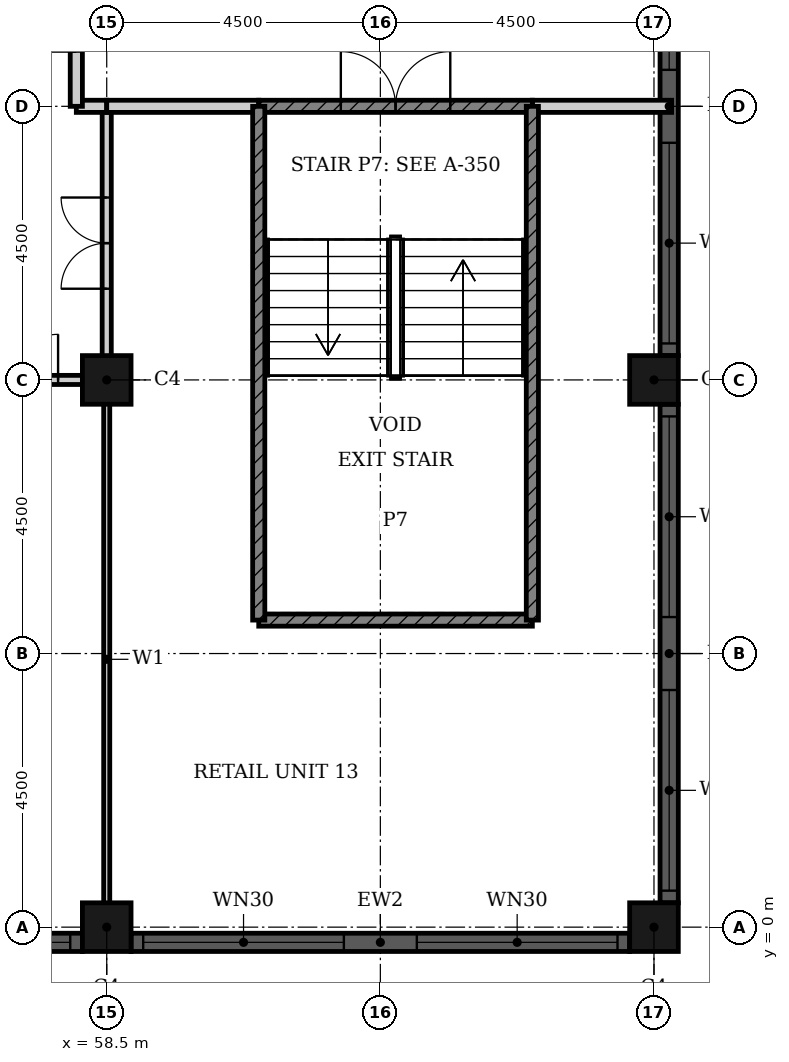
"""IFC4 building model, lengths in metres.
Left out: names, types, materials, properties, quantities, classifications, styles, units other than length and angle.
Written with IfcOpenShell. Run it as: python <this file> out.ifc"""

import sys

from ifc_helpers import new_model, si_unit, direction, frame, frame_2d, origin, origin_2d, place, context, subcontext, project, spatial, rectangle, hollow_rectangle, extrude, element, fill, save


model = new_model("IFC4")
c1 = context("Model", 3, precision=1e-05, world=origin(), true_north=direction((0.0, 1.0)))
c2 = subcontext(c1, "Body", "Model", "MODEL_VIEW")
j1 = project(units=[si_unit("LENGTHUNIT", "METRE"), si_unit("PLANEANGLEUNIT", "RADIAN")], contexts=[c1])
p1 = place(None, origin())
s1 = spatial("IfcSite", under=j1, at=p1, CompositionType="ELEMENT")
p2 = place(p1, origin())
s2 = spatial("IfcBuilding", under=s1, at=p2, CompositionType="ELEMENT")
p3 = place(p2, frame((0.0, 0.0, 6.6)))
s3 = spatial("IfcBuildingStorey", under=s2, at=p3, CompositionType="ELEMENT", Elevation=6.6)
for number, where, z_axis, x_axis in (
    (1, (58.5, 0.0, 0.0), (0.0, 0.0, 1.0), (1.0, 0.0, 0.0)),
    (2, (67.5, 0.0, 0.0), (0.0, 0.0, 1.0), (1.0, 0.0, 0.0)),
    (3, (67.5, 9.0, 0.0), (0.0, 0.0, 1.0), (1.0, 0.0, 0.0)),
    (4, (58.5, 9.0, 0.0), (0.0, 0.0, 1.0), (1.0, 0.0, 0.0)),
):
    element("IfcColumn", number, at=place(p3, frame(where, z_axis=z_axis, x_axis=x_axis)), inside=s3, PredefinedType="COLUMN", context=c2, shape_type="SweptSolid", body=[
        extrude(hollow_rectangle(XDim=0.8, YDim=0.8, WallThickness=0.025, at=origin_2d()), origin(), (0.0, 0.0, 1.0), 5.4),
    ])
p4 = place(p3, frame((67.75, 0.4, 0.0), z_axis=(0.0, 0.0, 1.0), x_axis=(0.0, 1.0, 0.0)))
e5 = element("IfcWall", 5, at=p4, inside=s3, PredefinedType="SOLIDWALL", context=c2, shape_type="SweptSolid", body=[
    extrude(rectangle(XDim=8.2, YDim=0.3, at=frame_2d((4.1, 0.0))), origin(), (0.0, 0.0, 1.0), 5.4),
])
p5 = place(p4, frame((0.2, 0.0, 0.9)))
e6 = element("IfcOpeningElement", 6, at=p5, cuts=e5, PredefinedType="OPENING", context=c2, shape_type="SweptSolid", body=[
    extrude(rectangle(XDim=3.3, YDim=3.5, at=frame_2d((1.65, 1.75))), frame((0.0, 0.16, 0.0), z_axis=(0.0, -1.0, 0.0), x_axis=(1.0, 0.0, 0.0)), (0.0, 0.0, 1.0), 0.32),
])
p6 = place(p4, frame((4.7, 0.0, 0.9)))
e7 = element("IfcOpeningElement", 7, at=p6, cuts=e5, PredefinedType="OPENING", context=c2, shape_type="SweptSolid", body=[
    extrude(rectangle(XDim=3.3, YDim=3.5, at=frame_2d((1.65, 1.75))), frame((0.0, 0.16, 0.0), z_axis=(0.0, -1.0, 0.0), x_axis=(1.0, 0.0, 0.0)), (0.0, 0.0, 1.0), 0.32),
])
p7 = place(p3, frame((67.75, 9.4, 0.0), z_axis=(0.0, 0.0, 1.0), x_axis=(0.0, 1.0, 0.0)))
e8 = element("IfcWall", 8, at=p7, inside=s3, PredefinedType="SOLIDWALL", context=c2, shape_type="SweptSolid", body=[
    extrude(rectangle(XDim=8.2, YDim=0.3, at=frame_2d((4.1, 0.0))), origin(), (0.0, 0.0, 1.0), 5.4),
])
p8 = place(p7, frame((0.2, 0.0, 0.9)))
e9 = element("IfcOpeningElement", 9, at=p8, cuts=e8, PredefinedType="OPENING", context=c2, shape_type="SweptSolid", body=[
    extrude(rectangle(XDim=3.3, YDim=3.5, at=frame_2d((1.65, 1.75))), frame((0.0, 0.16, 0.0), z_axis=(0.0, -1.0, 0.0), x_axis=(1.0, 0.0, 0.0)), (0.0, 0.0, 1.0), 0.32),
])
p9 = place(p7, frame((4.7, 0.0, 0.9)))
e10 = element("IfcOpeningElement", 10, at=p9, cuts=e8, PredefinedType="OPENING", context=c2, shape_type="SweptSolid", body=[
    extrude(rectangle(XDim=3.3, YDim=3.5, at=frame_2d((1.65, 1.75))), frame((0.0, 0.16, 0.0), z_axis=(0.0, -1.0, 0.0), x_axis=(1.0, 0.0, 0.0)), (0.0, 0.0, 1.0), 0.32),
])
p10 = place(p3, frame((49.9, -0.25, 0.0), z_axis=(0.0, 0.0, 1.0), x_axis=(1.0, 0.0, 0.0)))
e11 = element("IfcWall", 11, at=p10, inside=s3, PredefinedType="SOLIDWALL", context=c2, shape_type="SweptSolid", body=[
    extrude(rectangle(XDim=8.2, YDim=0.3, at=frame_2d((4.1, 0.0))), origin(), (0.0, 0.0, 1.0), 5.4),
])
p11 = place(p10, frame((0.2, 0.0, 0.9)))
e12 = element("IfcOpeningElement", 12, at=p11, cuts=e11, PredefinedType="OPENING", context=c2, shape_type="SweptSolid", body=[
    extrude(rectangle(XDim=3.3, YDim=3.5, at=frame_2d((1.65, 1.75))), frame((0.0, 0.16, 0.0), z_axis=(0.0, -1.0, 0.0), x_axis=(1.0, 0.0, 0.0)), (0.0, 0.0, 1.0), 0.32),
])
p12 = place(p10, frame((4.7, 0.0, 0.9)))
e13 = element("IfcOpeningElement", 13, at=p12, cuts=e11, PredefinedType="OPENING", context=c2, shape_type="SweptSolid", body=[
    extrude(rectangle(XDim=3.3, YDim=3.5, at=frame_2d((1.65, 1.75))), frame((0.0, 0.16, 0.0), z_axis=(0.0, -1.0, 0.0), x_axis=(1.0, 0.0, 0.0)), (0.0, 0.0, 1.0), 0.32),
])
p13 = place(p3, frame((58.9, -0.25, 0.0), z_axis=(0.0, 0.0, 1.0), x_axis=(1.0, 0.0, 0.0)))
e14 = element("IfcWall", 14, at=p13, inside=s3, PredefinedType="SOLIDWALL", context=c2, shape_type="SweptSolid", body=[
    extrude(rectangle(XDim=8.2, YDim=0.3, at=frame_2d((4.1, 0.0))), origin(), (0.0, 0.0, 1.0), 5.4),
])
p14 = place(p13, frame((0.2, 0.0, 0.9)))
e15 = element("IfcOpeningElement", 15, at=p14, cuts=e14, PredefinedType="OPENING", context=c2, shape_type="SweptSolid", body=[
    extrude(rectangle(XDim=3.3, YDim=3.5, at=frame_2d((1.65, 1.75))), frame((0.0, 0.16, 0.0), z_axis=(0.0, -1.0, 0.0), x_axis=(1.0, 0.0, 0.0)), (0.0, 0.0, 1.0), 0.32),
])
p15 = place(p13, frame((4.7, 0.0, 0.9)))
e16 = element("IfcOpeningElement", 16, at=p15, cuts=e14, PredefinedType="OPENING", context=c2, shape_type="SweptSolid", body=[
    extrude(rectangle(XDim=3.3, YDim=3.5, at=frame_2d((1.65, 1.75))), frame((0.0, 0.16, 0.0), z_axis=(0.0, -1.0, 0.0), x_axis=(1.0, 0.0, 0.0)), (0.0, 0.0, 1.0), 0.32),
])
p16 = place(p3, frame((55.4, 9.0, 0.0), z_axis=(0.0, 0.0, 1.0), x_axis=(1.0, 0.0, 0.0)))
e17 = element("IfcWall", 17, at=p16, inside=s3, PredefinedType="PARTITIONING", context=c2, shape_type="SweptSolid", body=[
    extrude(rectangle(XDim=3.1, YDim=0.15, at=frame_2d((1.55, 0.0))), origin(), (0.0, 0.0, 1.0), 5.05),
])
p17 = place(p16, frame((0.8, 0.0, 0.0)))
e18 = element("IfcOpeningElement", 18, at=p17, cuts=e17, PredefinedType="OPENING", context=c2, shape_type="SweptSolid", body=[
    extrude(rectangle(XDim=1.5, YDim=2.4, at=frame_2d((0.75, 1.2))), frame((0.0, 0.085, 0.0), z_axis=(0.0, -1.0, 0.0), x_axis=(1.0, 0.0, 0.0)), (0.0, 0.0, 1.0), 0.17),
])
p18 = place(p3, frame((58.5, 9.0, 0.0), z_axis=(0.0, 0.0, 1.0), x_axis=(0.0, 1.0, 0.0)))
e19 = element("IfcWall", 19, at=p18, inside=s3, PredefinedType="PARTITIONING", context=c2, shape_type="SweptSolid", body=[
    extrude(rectangle(XDim=4.5, YDim=0.15, at=frame_2d((2.25, 0.0))), origin(), (0.0, 0.0, 1.0), 5.05),
])
p19 = place(p18, frame((1.5, 0.0, 0.0)))
e20 = element("IfcOpeningElement", 20, at=p19, cuts=e19, PredefinedType="OPENING", context=c2, shape_type="SweptSolid", body=[
    extrude(rectangle(XDim=1.5, YDim=2.4, at=frame_2d((0.75, 1.2))), frame((0.0, 0.085, 0.0), z_axis=(0.0, -1.0, 0.0), x_axis=(1.0, 0.0, 0.0)), (0.0, 0.0, 1.0), 0.17),
])
p20 = place(p3, frame((58.5, -0.19, 0.0), z_axis=(0.0, 0.0, 1.0), x_axis=(0.0, 1.0, 0.0)))
e21 = element("IfcWall", 21, at=p20, inside=s3, PredefinedType="PARTITIONING", context=c2, shape_type="SweptSolid", body=[
    extrude(rectangle(XDim=9.19, YDim=0.1, at=frame_2d((4.595, 0.0))), origin(), (0.0, 0.0, 1.0), 5.05),
])
p21 = place(p3, frame((58.0, 13.5, 0.0), z_axis=(0.0, 0.0, 1.0), x_axis=(1.0, 0.0, 0.0)))
e22 = element("IfcWall", 22, at=p21, inside=s3, PredefinedType="PARTITIONING", context=c2, shape_type="SweptSolid", body=[
    extrude(rectangle(XDim=0.5, YDim=0.2, at=frame_2d((0.25, 0.0))), origin(), (0.0, 0.0, 1.0), 5.05),
])
p22 = place(p3, frame((58.5, 13.5, 0.0), z_axis=(0.0, 0.0, 1.0), x_axis=(1.0, 0.0, 0.0)))
e23 = element("IfcWall", 23, at=p22, inside=s3, PredefinedType="PARTITIONING", context=c2, shape_type="SweptSolid", body=[
    extrude(rectangle(XDim=2.5, YDim=0.2, at=frame_2d((1.25, 0.0))), origin(), (0.0, 0.0, 1.0), 5.05),
])
p23 = place(p3, frame((65.5, 13.5, 0.0), z_axis=(0.0, 0.0, 1.0), x_axis=(1.0, 0.0, 0.0)))
e24 = element("IfcWall", 24, at=p23, inside=s3, PredefinedType="PARTITIONING", context=c2, shape_type="SweptSolid", body=[
    extrude(rectangle(XDim=2.29, YDim=0.2, at=frame_2d((1.145, 0.0))), origin(), (0.0, 0.0, 1.0), 5.05),
])
p24 = place(p3, frame((58.0, 13.5, 0.0), z_axis=(0.0, 0.0, 1.0), x_axis=(0.0, 1.0, 0.0)))
e25 = element("IfcWall", 25, at=p24, inside=s3, PredefinedType="PARTITIONING", context=c2, shape_type="SweptSolid", body=[
    extrude(rectangle(XDim=3.0, YDim=0.2, at=frame_2d((1.5, 0.0))), origin(), (0.0, 0.0, 1.0), 5.05),
])
p25 = place(p24, frame((0.9, 0.0, 0.0)))
e26 = element("IfcOpeningElement", 26, at=p25, cuts=e25, PredefinedType="OPENING", context=c2, shape_type="SweptSolid", body=[
    extrude(rectangle(XDim=1.2, YDim=2.1, at=frame_2d((0.6, 1.05))), frame((0.0, 0.11, 0.0), z_axis=(0.0, -1.0, 0.0), x_axis=(1.0, 0.0, 0.0)), (0.0, 0.0, 1.0), 0.22),
])
p26 = place(p3, frame((61.0, 13.5, 0.0), z_axis=(0.0, 0.0, 1.0), x_axis=(1.0, 0.0, 0.0)))
e27 = element("IfcWall", 27, at=p26, inside=s3, PredefinedType="SHEAR", context=c2, shape_type="SweptSolid", body=[
    extrude(rectangle(XDim=4.5, YDim=0.2, at=frame_2d((2.25, 0.0))), origin(), (0.0, 0.0, 1.0), 5.05),
])
p27 = place(p26, frame((1.35, 0.0, 0.0)))
e28 = element("IfcOpeningElement", 28, at=p27, cuts=e27, PredefinedType="OPENING", context=c2, shape_type="SweptSolid", body=[
    extrude(rectangle(XDim=1.8, YDim=2.1, at=frame_2d((0.9, 1.05))), frame((0.0, 0.11, 0.0), z_axis=(0.0, -1.0, 0.0), x_axis=(1.0, 0.0, 0.0)), (0.0, 0.0, 1.0), 0.22),
])
p28 = place(p3, frame((61.0, 5.05, 0.0), z_axis=(0.0, 0.0, 1.0), x_axis=(1.0, 0.0, 0.0)))
e29 = element("IfcWall", 29, at=p28, inside=s3, PredefinedType="SHEAR", context=c2, shape_type="SweptSolid", body=[
    extrude(rectangle(XDim=4.5, YDim=0.2, at=frame_2d((2.25, 0.0))), origin(), (0.0, 0.0, 1.0), 5.05),
])
for number, where, z_axis, x_axis in (
    (30, (61.0, 5.05, 0.0), (0.0, 0.0, 1.0), (0.0, 1.0, 0.0)),
    (31, (65.5, 5.05, 0.0), (0.0, 0.0, 1.0), (0.0, 1.0, 0.0)),
):
    element("IfcWall", number, at=place(p3, frame(where, z_axis=z_axis, x_axis=x_axis)), inside=s3, PredefinedType="SHEAR", context=c2, shape_type="SweptSolid", body=[
        extrude(rectangle(XDim=8.45, YDim=0.2, at=frame_2d((4.225, 0.0))), origin(), (0.0, 0.0, 1.0), 5.05),
    ])
p29 = place(p5, origin())
e32 = element("IfcWindow", 32, at=p29, inside=s3, PartitioningType="SINGLE_PANEL", PredefinedType="WINDOW", context=c2, shape_type="SweptSolid", body=[
    extrude(rectangle(XDim=3.3, YDim=3.5, at=frame_2d((1.65, 1.75))), frame((0.0, 0.03, 0.0), z_axis=(0.0, -1.0, 0.0), x_axis=(1.0, 0.0, 0.0)), (0.0, 0.0, 1.0), 0.06),
])
fill(e6, e32)
p30 = place(p6, origin())
e33 = element("IfcWindow", 33, at=p30, inside=s3, PartitioningType="SINGLE_PANEL", PredefinedType="WINDOW", context=c2, shape_type="SweptSolid", body=[
    extrude(rectangle(XDim=3.3, YDim=3.5, at=frame_2d((1.65, 1.75))), frame((0.0, 0.03, 0.0), z_axis=(0.0, -1.0, 0.0), x_axis=(1.0, 0.0, 0.0)), (0.0, 0.0, 1.0), 0.06),
])
fill(e7, e33)
p31 = place(p8, origin())
e34 = element("IfcWindow", 34, at=p31, inside=s3, PartitioningType="SINGLE_PANEL", PredefinedType="WINDOW", context=c2, shape_type="SweptSolid", body=[
    extrude(rectangle(XDim=3.3, YDim=3.5, at=frame_2d((1.65, 1.75))), frame((0.0, 0.03, 0.0), z_axis=(0.0, -1.0, 0.0), x_axis=(1.0, 0.0, 0.0)), (0.0, 0.0, 1.0), 0.06),
])
fill(e9, e34)
p32 = place(p9, origin())
e35 = element("IfcWindow", 35, at=p32, inside=s3, PartitioningType="SINGLE_PANEL", PredefinedType="WINDOW", context=c2, shape_type="SweptSolid", body=[
    extrude(rectangle(XDim=3.3, YDim=3.5, at=frame_2d((1.65, 1.75))), frame((0.0, 0.03, 0.0), z_axis=(0.0, -1.0, 0.0), x_axis=(1.0, 0.0, 0.0)), (0.0, 0.0, 1.0), 0.06),
])
fill(e10, e35)
p33 = place(p12, origin())
e36 = element("IfcWindow", 36, at=p33, inside=s3, PartitioningType="SINGLE_PANEL", PredefinedType="WINDOW", context=c2, shape_type="SweptSolid", body=[
    extrude(rectangle(XDim=3.3, YDim=3.5, at=frame_2d((1.65, 1.75))), frame((0.0, 0.03, 0.0), z_axis=(0.0, -1.0, 0.0), x_axis=(1.0, 0.0, 0.0)), (0.0, 0.0, 1.0), 0.06),
])
fill(e13, e36)
p34 = place(p14, origin())
e37 = element("IfcWindow", 37, at=p34, inside=s3, PartitioningType="SINGLE_PANEL", PredefinedType="WINDOW", context=c2, shape_type="SweptSolid", body=[
    extrude(rectangle(XDim=3.3, YDim=3.5, at=frame_2d((1.65, 1.75))), frame((0.0, 0.03, 0.0), z_axis=(0.0, -1.0, 0.0), x_axis=(1.0, 0.0, 0.0)), (0.0, 0.0, 1.0), 0.06),
])
fill(e15, e37)
p35 = place(p15, origin())
e38 = element("IfcWindow", 38, at=p35, inside=s3, PartitioningType="SINGLE_PANEL", PredefinedType="WINDOW", context=c2, shape_type="SweptSolid", body=[
    extrude(rectangle(XDim=3.3, YDim=3.5, at=frame_2d((1.65, 1.75))), frame((0.0, 0.03, 0.0), z_axis=(0.0, -1.0, 0.0), x_axis=(1.0, 0.0, 0.0)), (0.0, 0.0, 1.0), 0.06),
])
fill(e16, e38)
p36 = place(p27, origin())
e39 = element("IfcDoor", 39, at=p36, inside=s3, OperationType="DOUBLE_DOOR_SINGLE_SWING", PredefinedType="DOOR", context=c2, shape_type="SweptSolid", body=[
    extrude(rectangle(XDim=1.8, YDim=2.1, at=frame_2d((0.9, 1.05))), frame((0.0, 0.025, 0.0), z_axis=(0.0, -1.0, 0.0), x_axis=(1.0, 0.0, 0.0)), (0.0, 0.0, 1.0), 0.05),
])
fill(e28, e39)
p37 = place(p19, origin())
e40 = element("IfcDoor", 40, at=p37, inside=s3, OperationType="DOUBLE_DOOR_SINGLE_SWING", PredefinedType="DOOR", context=c2, shape_type="SweptSolid", body=[
    extrude(rectangle(XDim=1.5, YDim=2.4, at=frame_2d((0.75, 1.2))), frame((0.0, 0.025, 0.0), z_axis=(0.0, -1.0, 0.0), x_axis=(1.0, 0.0, 0.0)), (0.0, 0.0, 1.0), 0.05),
])
fill(e20, e40)
p38 = place(p17, origin())
e41 = element("IfcDoor", 41, at=p38, inside=s3, OperationType="DOUBLE_DOOR_SINGLE_SWING", PredefinedType="DOOR", context=c2, shape_type="SweptSolid", body=[
    extrude(rectangle(XDim=1.5, YDim=2.4, at=frame_2d((0.75, 1.2))), frame((0.0, 0.025, 0.0), z_axis=(0.0, -1.0, 0.0), x_axis=(1.0, 0.0, 0.0)), (0.0, 0.0, 1.0), 0.05),
])
fill(e18, e41)
save(model, sys.argv[1])
